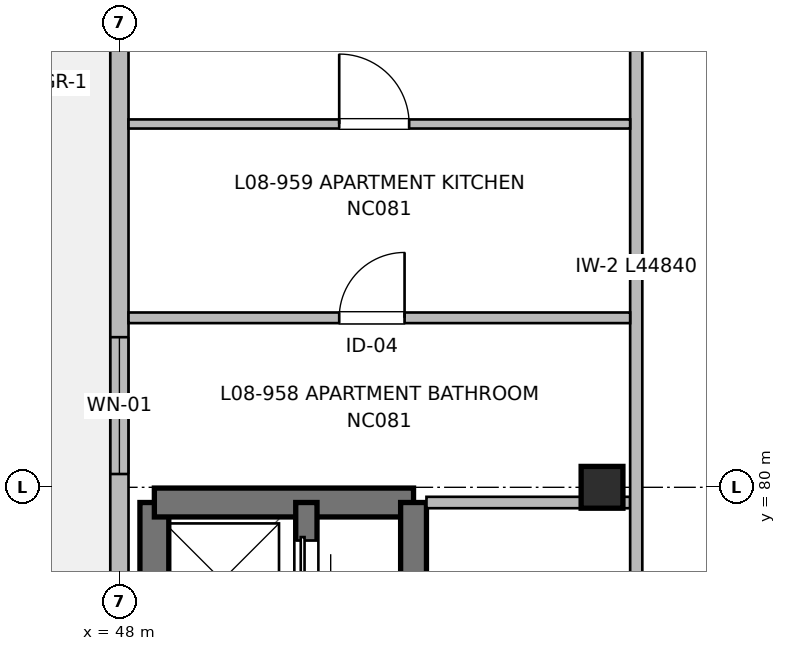
"""IFC4 building model, lengths in metres.
Left out: names, types, materials, properties, quantities, classifications, styles, units other than length and angle.
Written with IfcOpenShell. Run it as: python <this file> out.ifc"""

import sys

from ifc_helpers import new_model, si_unit, direction, frame, frame_2d, origin, origin_2d, place, context, subcontext, project, spatial, rectangle, extrude, element, fill, save


model = new_model("IFC4")
c1 = context("Model", 3, precision=1e-05, world=origin(), true_north=direction((0.0, 1.0)))
c2 = subcontext(c1, "Body", "Model", "MODEL_VIEW")
j1 = project(units=[si_unit("LENGTHUNIT", "METRE"), si_unit("PLANEANGLEUNIT", "RADIAN")], contexts=[c1])
p1 = place(None, origin())
s1 = spatial("IfcSite", under=j1, at=p1, CompositionType="ELEMENT")
p2 = place(p1, origin())
s2 = spatial("IfcBuilding", under=s1, at=p2, CompositionType="ELEMENT")
p3 = place(p2, frame((0.0, 0.0, 26.56)))
s3 = spatial("IfcBuildingStorey", under=s2, at=p3, CompositionType="ELEMENT", Elevation=26.56)
p4 = place(p3, frame((54.35, 80.0, 0.0), z_axis=(0.0, 0.0, 1.0), x_axis=(1.0, 0.0, 0.0)))
e1 = element("IfcColumn", 1, at=p4, inside=s3, PredefinedType="COLUMN", context=c2, shape_type="SweptSolid", body=[
    extrude(rectangle(XDim=0.55, YDim=0.55, at=origin_2d()), origin(), (0.0, 0.0, 1.0), 3.2),
])
p5 = place(p3, frame((48.46, 67.35, 0.0), z_axis=(0.0, 0.0, 1.0), x_axis=(0.0, 1.0, 0.0)))
e2 = element("IfcWall", 2, at=p5, inside=s3, PredefinedType="SHEAR", context=c2, shape_type="SweptSolid", body=[
    extrude(rectangle(XDim=12.45, YDim=0.38, at=frame_2d((6.225, 0.0))), origin(), (0.0, 0.0, 1.0), 3.2),
])
p6 = place(p5, frame((2.2, 0.0, 0.97)))
e3 = element("IfcOpeningElement", 3, at=p6, cuts=e2, PredefinedType="OPENING", context=c2, shape_type="SweptSolid", body=[
    extrude(rectangle(XDim=0.95, YDim=1.25, at=frame_2d((0.475, 0.625))), frame((0.0, 0.2, 0.0), z_axis=(0.0, -1.0, 0.0), x_axis=(1.0, 0.0, 0.0)), (0.0, 0.0, 1.0), 0.4),
])
p7 = place(p3, frame((48.46, 79.8, 0.0), z_axis=(0.0, 0.0, 1.0), x_axis=(1.0, 0.0, 0.0)))
e4 = element("IfcWall", 4, at=p7, inside=s3, PredefinedType="SHEAR", context=c2, shape_type="SweptSolid", body=[
    extrude(rectangle(XDim=3.41, YDim=0.38, at=frame_2d((1.705, 0.0))), origin(), (0.0, 0.0, 1.0), 3.2),
])
p8 = place(p3, frame((51.87, 79.8, 0.0), z_axis=(0.0, 0.0, 1.0), x_axis=(0.0, -1.0, 0.0)))
e5 = element("IfcWall", 5, at=p8, inside=s3, PredefinedType="SHEAR", context=c2, shape_type="SweptSolid", body=[
    extrude(rectangle(XDim=12.45, YDim=0.34, at=frame_2d((6.225, 0.0))), origin(), (0.0, 0.0, 1.0), 3.2),
])
p9 = place(p8, frame((10.85, 0.0, 0.0)))
e6 = element("IfcOpeningElement", 6, at=p9, cuts=e5, PredefinedType="OPENING", context=c2, shape_type="SweptSolid", body=[
    extrude(rectangle(XDim=1.05, YDim=2.15, at=frame_2d((0.525, 1.075))), frame((0.0, 0.18, 0.0), z_axis=(0.0, -1.0, 0.0), x_axis=(1.0, 0.0, 0.0)), (0.0, 0.0, 1.0), 0.36),
])
p10 = place(p3, frame((50.46, 74.55, 0.0), z_axis=(0.0, 0.0, 1.0), x_axis=(0.0, 1.0, 0.0)))
e7 = element("IfcWall", 7, at=p10, inside=s3, PredefinedType="SHEAR", context=c2, shape_type="SweptSolid", body=[
    extrude(rectangle(XDim=5.25, YDim=0.28, at=frame_2d((2.625, 0.0))), origin(), (0.0, 0.0, 1.0), 3.2),
])
p11 = place(p10, frame((1.15, 0.0, 0.0)))
e8 = element("IfcOpeningElement", 8, at=p11, cuts=e7, PredefinedType="OPENING", context=c2, shape_type="SweptSolid", body=[
    extrude(rectangle(XDim=1.0, YDim=2.15, at=frame_2d((0.5, 1.075))), frame((0.0, 0.15, 0.0), z_axis=(0.0, -1.0, 0.0), x_axis=(1.0, 0.0, 0.0)), (0.0, 0.0, 1.0), 0.3),
])
p12 = place(p10, frame((3.85, 0.0, 0.0)))
e9 = element("IfcOpeningElement", 9, at=p12, cuts=e7, PredefinedType="OPENING", context=c2, shape_type="SweptSolid", body=[
    extrude(rectangle(XDim=0.9, YDim=2.15, at=frame_2d((0.45, 1.075))), frame((0.0, 0.15, 0.0), z_axis=(0.0, -1.0, 0.0), x_axis=(1.0, 0.0, 0.0)), (0.0, 0.0, 1.0), 0.3),
])
p13 = place(p3, frame((48.0, 61.8, 0.0), z_axis=(0.0, 0.0, 1.0), x_axis=(0.0, 1.0, 0.0)))
e10 = element("IfcWall", 10, at=p13, inside=s3, PredefinedType="SOLIDWALL", context=c2, shape_type="SweptSolid", body=[
    extrude(rectangle(XDim=32.2, YDim=0.24, at=frame_2d((16.1, 0.0))), origin(), (0.0, 0.0, 1.0), 2.98),
])
p14 = place(p13, frame((2.975, 0.0, 0.0)))
e11 = element("IfcOpeningElement", 11, at=p14, cuts=e10, PredefinedType="OPENING", context=c2, shape_type="SweptSolid", body=[
    extrude(rectangle(XDim=1.2, YDim=2.2, at=frame_2d((0.6, 1.1))), frame((0.0, 0.13, 0.0), z_axis=(0.0, -1.0, 0.0), x_axis=(1.0, 0.0, 0.0)), (0.0, 0.0, 1.0), 0.26),
])
p15 = place(p13, frame((5.775, 0.0, 0.87)))
e12 = element("IfcOpeningElement", 12, at=p15, cuts=e10, PredefinedType="OPENING", context=c2, shape_type="SweptSolid", body=[
    extrude(rectangle(XDim=1.25, YDim=1.35, at=frame_2d((0.625, 0.675))), frame((0.0, 0.13, 0.0), z_axis=(0.0, -1.0, 0.0), x_axis=(1.0, 0.0, 0.0)), (0.0, 0.0, 1.0), 0.26),
])
p16 = place(p13, frame((10.385, 0.0, 0.72)))
e13 = element("IfcOpeningElement", 13, at=p16, cuts=e10, PredefinedType="OPENING", context=c2, shape_type="SweptSolid", body=[
    extrude(rectangle(XDim=1.68, YDim=1.5, at=frame_2d((0.84, 0.75))), frame((0.0, 0.13, 0.0), z_axis=(0.0, -1.0, 0.0), x_axis=(1.0, 0.0, 0.0)), (0.0, 0.0, 1.0), 0.26),
])
p17 = place(p13, frame((18.375, 0.0, 0.72)))
e14 = element("IfcOpeningElement", 14, at=p17, cuts=e10, PredefinedType="OPENING", context=c2, shape_type="SweptSolid", body=[
    extrude(rectangle(XDim=1.8, YDim=1.5, at=frame_2d((0.9, 0.75))), frame((0.0, 0.13, 0.0), z_axis=(0.0, -1.0, 0.0), x_axis=(1.0, 0.0, 0.0)), (0.0, 0.0, 1.0), 0.26),
])
p18 = place(p13, frame((27.175, 0.0, 0.72)))
e15 = element("IfcOpeningElement", 15, at=p18, cuts=e10, PredefinedType="OPENING", context=c2, shape_type="SweptSolid", body=[
    extrude(rectangle(XDim=2.0, YDim=1.5, at=frame_2d((1.0, 0.75))), frame((0.0, 0.13, 0.0), z_axis=(0.0, -1.0, 0.0), x_axis=(1.0, 0.0, 0.0)), (0.0, 0.0, 1.0), 0.26),
])
p19 = place(p3, frame((52.04, 79.8, 0.0), z_axis=(0.0, 0.0, 1.0), x_axis=(1.0, 0.0, 0.0)))
e16 = element("IfcWall", 16, at=p19, inside=s3, PredefinedType="PARTITIONING", context=c2, shape_type="SweptSolid", body=[
    extrude(rectangle(XDim=2.68, YDim=0.15, at=frame_2d((1.34, 0.0))), origin(), (0.0, 0.0, 1.0), 2.935),
])
p20 = place(p3, frame((54.8, 61.96, 0.0), z_axis=(0.0, 0.0, 1.0), x_axis=(0.0, 1.0, 0.0)))
e17 = element("IfcWall", 17, at=p20, inside=s3, PredefinedType="PARTITIONING", context=c2, shape_type="SweptSolid", body=[
    extrude(rectangle(XDim=44.84, YDim=0.16, at=frame_2d((22.42, 0.0))), origin(), (0.0, 0.0, 1.0), 2.935),
])
p21 = place(p20, frame((7.04, 0.0, 0.0)))
e18 = element("IfcOpeningElement", 18, at=p21, cuts=e17, PredefinedType="OPENING", context=c2, shape_type="SweptSolid", body=[
    extrude(rectangle(XDim=1.1, YDim=2.15, at=frame_2d((0.55, 1.075))), frame((0.0, 0.09, 0.0), z_axis=(0.0, -1.0, 0.0), x_axis=(1.0, 0.0, 0.0)), (0.0, 0.0, 1.0), 0.18),
])
p22 = place(p20, frame((13.44, 0.0, 0.0)))
e19 = element("IfcOpeningElement", 19, at=p22, cuts=e17, PredefinedType="OPENING", context=c2, shape_type="SweptSolid", body=[
    extrude(rectangle(XDim=1.6, YDim=2.15, at=frame_2d((0.8, 1.075))), frame((0.0, 0.09, 0.0), z_axis=(0.0, -1.0, 0.0), x_axis=(1.0, 0.0, 0.0)), (0.0, 0.0, 1.0), 0.18),
])
p23 = place(p20, frame((3.0, 0.0, 0.0)))
e20 = element("IfcOpeningElement", 20, at=p23, cuts=e17, PredefinedType="OPENING", context=c2, shape_type="SweptSolid", body=[
    extrude(rectangle(XDim=0.96, YDim=2.15, at=frame_2d((0.48, 1.075))), frame((0.0, 0.09, 0.0), z_axis=(0.0, -1.0, 0.0), x_axis=(1.0, 0.0, 0.0)), (0.0, 0.0, 1.0), 0.18),
])
p24 = place(p20, frame((26.845, 0.0, 0.0)))
e21 = element("IfcOpeningElement", 21, at=p24, cuts=e17, PredefinedType="OPENING", context=c2, shape_type="SweptSolid", body=[
    extrude(rectangle(XDim=0.98, YDim=2.15, at=frame_2d((0.49, 1.075))), frame((0.0, 0.09, 0.0), z_axis=(0.0, -1.0, 0.0), x_axis=(1.0, 0.0, 0.0)), (0.0, 0.0, 1.0), 0.18),
])
p25 = place(p20, frame((35.455, 0.0, 0.0)))
e22 = element("IfcOpeningElement", 22, at=p25, cuts=e17, PredefinedType="OPENING", context=c2, shape_type="SweptSolid", body=[
    extrude(rectangle(XDim=0.98, YDim=2.15, at=frame_2d((0.49, 1.075))), frame((0.0, 0.09, 0.0), z_axis=(0.0, -1.0, 0.0), x_axis=(1.0, 0.0, 0.0)), (0.0, 0.0, 1.0), 0.18),
])
p26 = place(p3, frame((48.12, 82.23, 0.0), z_axis=(0.0, 0.0, 1.0), x_axis=(1.0, 0.0, 0.0)))
e23 = element("IfcWall", 23, at=p26, inside=s3, PredefinedType="PARTITIONING", context=c2, shape_type="SweptSolid", body=[
    extrude(rectangle(XDim=6.6, YDim=0.14, at=frame_2d((3.3, 0.0))), origin(), (0.0, 0.0, 1.0), 2.935),
])
p27 = place(p26, frame((2.772, 0.0, 0.0)))
e24 = element("IfcOpeningElement", 24, at=p27, cuts=e23, PredefinedType="OPENING", context=c2, shape_type="SweptSolid", body=[
    extrude(rectangle(XDim=0.86, YDim=2.1, at=frame_2d((0.43, 1.05))), frame((0.0, 0.08, 0.0), z_axis=(0.0, -1.0, 0.0), x_axis=(1.0, 0.0, 0.0)), (0.0, 0.0, 1.0), 0.16),
])
p28 = place(p3, frame((48.12, 84.78, 0.0), z_axis=(0.0, 0.0, 1.0), x_axis=(1.0, 0.0, 0.0)))
e25 = element("IfcWall", 25, at=p28, inside=s3, PredefinedType="PARTITIONING", context=c2, shape_type="SweptSolid", body=[
    extrude(rectangle(XDim=6.6, YDim=0.12, at=frame_2d((3.3, 0.0))), origin(), (0.0, 0.0, 1.0), 2.935),
])
p29 = place(p28, frame((2.772, 0.0, 0.0)))
e26 = element("IfcOpeningElement", 26, at=p29, cuts=e25, PredefinedType="OPENING", context=c2, shape_type="SweptSolid", body=[
    extrude(rectangle(XDim=0.92, YDim=2.1, at=frame_2d((0.46, 1.05))), frame((0.0, 0.07, 0.0), z_axis=(0.0, -1.0, 0.0), x_axis=(1.0, 0.0, 0.0)), (0.0, 0.0, 1.0), 0.14),
])
p30 = place(p12, origin())
e27 = element("IfcDoor", 27, at=p30, inside=s3, OperationType="SLIDING_TO_RIGHT", PredefinedType="DOOR", context=c2, shape_type="SweptSolid", body=[
    extrude(rectangle(XDim=0.9, YDim=2.15, at=frame_2d((0.45, 1.075))), frame((0.0, 0.025, 0.0), z_axis=(0.0, -1.0, 0.0), x_axis=(1.0, 0.0, 0.0)), (0.0, 0.0, 1.0), 0.05),
])
fill(e9, e27)
p31 = place(p17, origin())
e28 = element("IfcWindow", 28, at=p31, inside=s3, PartitioningType="SINGLE_PANEL", PredefinedType="WINDOW", context=c2, shape_type="SweptSolid", body=[
    extrude(rectangle(XDim=1.8, YDim=1.5, at=frame_2d((0.9, 0.75))), frame((0.0, 0.03, 0.0), z_axis=(0.0, -1.0, 0.0), x_axis=(1.0, 0.0, 0.0)), (0.0, 0.0, 1.0), 0.06),
])
fill(e14, e28)
p32 = place(p27, origin())
e29 = element("IfcDoor", 29, at=p32, inside=s3, OperationType="SINGLE_SWING_RIGHT", PredefinedType="DOOR", context=c2, shape_type="SweptSolid", body=[
    extrude(rectangle(XDim=0.86, YDim=2.1, at=frame_2d((0.43, 1.05))), frame((0.0, 0.025, 0.0), z_axis=(0.0, -1.0, 0.0), x_axis=(1.0, 0.0, 0.0)), (0.0, 0.0, 1.0), 0.05),
])
fill(e24, e29)
p33 = place(p29, origin())
e30 = element("IfcDoor", 30, at=p33, inside=s3, OperationType="SINGLE_SWING_LEFT", PredefinedType="DOOR", context=c2, shape_type="SweptSolid", body=[
    extrude(rectangle(XDim=0.92, YDim=2.1, at=frame_2d((0.46, 1.05))), frame((0.0, 0.025, 0.0), z_axis=(0.0, -1.0, 0.0), x_axis=(1.0, 0.0, 0.0)), (0.0, 0.0, 1.0), 0.05),
])
fill(e26, e30)
save(model, sys.argv[1])
